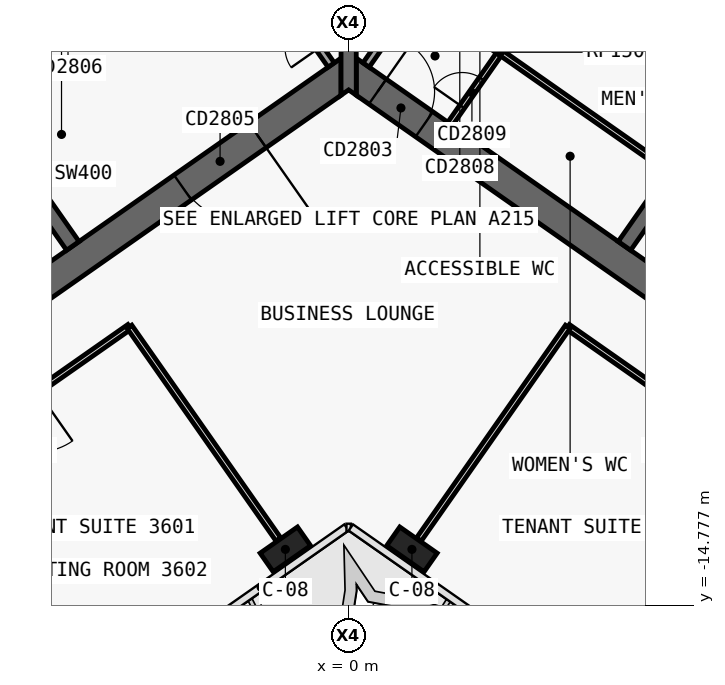
"""IFC4 building model, lengths in metres.
Left out: names, types, materials, properties, quantities, classifications, styles, units other than length and angle.
Written with IfcOpenShell. Run it as: python <this file> out.ifc"""

import sys

from ifc_helpers import new_model, si_unit, direction, frame, frame_2d, origin, origin_2d, place, context, subcontext, project, spatial, polyline, rectangle, outline, extrude, element, fill, save


model = new_model("IFC4")
c1 = context("Model", 3, precision=1e-05, world=origin(), true_north=direction((0.0, 1.0)))
c2 = subcontext(c1, "Body", "Model", "MODEL_VIEW")
j1 = project(units=[si_unit("LENGTHUNIT", "METRE"), si_unit("PLANEANGLEUNIT", "RADIAN")], contexts=[c1])
p1 = place(None, origin())
s1 = spatial("IfcSite", under=j1, at=p1, CompositionType="ELEMENT")
p2 = place(p1, origin())
s2 = spatial("IfcBuilding", under=s1, at=p2, CompositionType="ELEMENT")
p3 = place(p2, frame((0.0, 0.0, 159.3)))
s3 = spatial("IfcBuildingStorey", under=s2, at=p3, CompositionType="ELEMENT", Elevation=159.3)
p4 = place(p3, frame((0.029, 11.984, 0.0), z_axis=(0.0, 0.0, 1.0), x_axis=(-0.819151382952, -0.573577380837, 0.0)))
e1 = element("IfcWall", 1, at=p4, inside=s3, PredefinedType="SHEAR", context=c2, shape_type="SweptSolid", body=[
    extrude(outline(polyline([(33.898, 0.4), (0.56, 0.4), (-0.0, -0.4), (33.898, -0.4), (33.898, 0.4)])), origin(), (0.0, 0.0, 1.0), 3.9),
])
p5 = place(p3, frame((0.029, -0.712, 0.0), z_axis=(0.0, 0.0, 1.0), x_axis=(-0.819151758019, -0.573576845187, 0.0)))
e2 = element("IfcWall", 2, at=p5, inside=s3, PredefinedType="SHEAR", context=c2, shape_type="SweptSolid", body=[
    extrude(outline(polyline([(26.616, 0.4), (0.56, 0.4), (-0.0, -0.4), (26.616, -0.4), (26.616, 0.4)])), origin(), (0.0, 0.0, 1.0), 3.9),
])
p6 = place(p5, frame((2.966, 0.0, 0.0)))
e3 = element("IfcOpeningElement", 3, at=p6, cuts=e2, PredefinedType="OPENING", context=c2, shape_type="SweptSolid", body=[
    extrude(rectangle(XDim=2.4, YDim=2.1, at=frame_2d((1.2, 1.05))), frame((0.0, 0.41, 0.0), z_axis=(0.0, -1.0, 0.0), x_axis=(1.0, 0.0, 0.0)), (0.0, 0.0, 1.0), 0.82),
])
p7 = place(p5, frame((11.916, 0.0, 0.0)))
e4 = element("IfcOpeningElement", 4, at=p7, cuts=e2, PredefinedType="OPENING", context=c2, shape_type="SweptSolid", body=[
    extrude(rectangle(XDim=2.4, YDim=2.1, at=frame_2d((1.2, 1.05))), frame((0.0, 0.41, 0.0), z_axis=(0.0, -1.0, 0.0), x_axis=(1.0, 0.0, 0.0)), (0.0, 0.0, 1.0), 0.82),
])
p8 = place(p3, frame((-7.258, -5.326, 0.0), z_axis=(0.0, 0.0, 1.0), x_axis=(-0.573540709186, 0.819177059558, 0.0)))
e5 = element("IfcWall", 5, at=p8, inside=s3, PredefinedType="SHEAR", context=c2, shape_type="SweptSolid", body=[
    extrude(outline(polyline([(4.6, 0.2), (-0.0, 0.2), (-0.0, -0.2), (4.6, -0.2), (4.6, 0.2)])), origin(), (0.0, 0.0, 1.0), 3.9),
])
p9 = place(p3, frame((-2.638, 3.768, 0.0), z_axis=(0.0, 0.0, 1.0), x_axis=(-0.81915267502, -0.573575535572, 0.0)))
e6 = element("IfcWall", 6, at=p9, inside=s3, PredefinedType="SHEAR", context=c2, shape_type="SweptSolid", body=[
    extrude(outline(polyline([(26.2, 0.2), (0.0, 0.2), (0.0, -0.2), (26.2, -0.2), (26.2, 0.2)])), origin(), (0.0, 0.0, 1.0), 3.9),
])
p10 = place(p9, frame((1.169, 0.0, 0.0)))
e7 = element("IfcOpeningElement", 7, at=p10, cuts=e6, PredefinedType="OPENING", context=c2, shape_type="SweptSolid", body=[
    extrude(rectangle(XDim=1.1, YDim=2.1, at=frame_2d((0.55, 1.05))), frame((0.0, 0.21, 0.0), z_axis=(0.0, -1.0, 0.0), x_axis=(1.0, 0.0, 0.0)), (0.0, 0.0, 1.0), 0.42),
])
p11 = place(p9, frame((3.206, 0.0, 0.0)))
e8 = element("IfcOpeningElement", 8, at=p11, cuts=e6, PredefinedType="OPENING", context=c2, shape_type="SweptSolid", body=[
    extrude(rectangle(XDim=1.1, YDim=2.1, at=frame_2d((0.55, 1.05))), frame((0.0, 0.21, 0.0), z_axis=(0.0, -1.0, 0.0), x_axis=(1.0, 0.0, 0.0)), (0.0, 0.0, 1.0), 0.42),
])
p12 = place(p9, frame((5.244, 0.0, 0.0)))
e9 = element("IfcOpeningElement", 9, at=p12, cuts=e6, PredefinedType="OPENING", context=c2, shape_type="SweptSolid", body=[
    extrude(rectangle(XDim=1.1, YDim=2.1, at=frame_2d((0.55, 1.05))), frame((0.0, 0.21, 0.0), z_axis=(0.0, -1.0, 0.0), x_axis=(1.0, 0.0, 0.0)), (0.0, 0.0, 1.0), 0.42),
])
p13 = place(p9, frame((7.281, 0.0, 0.0)))
e10 = element("IfcOpeningElement", 10, at=p13, cuts=e6, PredefinedType="OPENING", context=c2, shape_type="SweptSolid", body=[
    extrude(rectangle(XDim=1.1, YDim=2.1, at=frame_2d((0.55, 1.05))), frame((0.0, 0.21, 0.0), z_axis=(0.0, -1.0, 0.0), x_axis=(1.0, 0.0, 0.0)), (0.0, 0.0, 1.0), 0.42),
])
p14 = place(p9, frame((9.688, 0.0, 0.0)))
e11 = element("IfcOpeningElement", 11, at=p14, cuts=e6, PredefinedType="OPENING", context=c2, shape_type="SweptSolid", body=[
    extrude(rectangle(XDim=1.1, YDim=2.1, at=frame_2d((0.55, 1.05))), frame((0.0, 0.21, 0.0), z_axis=(0.0, -1.0, 0.0), x_axis=(1.0, 0.0, 0.0)), (0.0, 0.0, 1.0), 0.42),
])
p15 = place(p9, frame((11.863, 0.0, 0.0)))
e12 = element("IfcOpeningElement", 12, at=p15, cuts=e6, PredefinedType="OPENING", context=c2, shape_type="SweptSolid", body=[
    extrude(rectangle(XDim=1.1, YDim=2.1, at=frame_2d((0.55, 1.05))), frame((0.0, 0.21, 0.0), z_axis=(0.0, -1.0, 0.0), x_axis=(1.0, 0.0, 0.0)), (0.0, 0.0, 1.0), 0.42),
])
p16 = place(p9, frame((14.038, 0.0, 0.0)))
e13 = element("IfcOpeningElement", 13, at=p16, cuts=e6, PredefinedType="OPENING", context=c2, shape_type="SweptSolid", body=[
    extrude(rectangle(XDim=1.1, YDim=2.1, at=frame_2d((0.55, 1.05))), frame((0.0, 0.21, 0.0), z_axis=(0.0, -1.0, 0.0), x_axis=(1.0, 0.0, 0.0)), (0.0, 0.0, 1.0), 0.42),
])
p17 = place(p9, frame((16.212, 0.0, 0.0)))
e14 = element("IfcOpeningElement", 14, at=p17, cuts=e6, PredefinedType="OPENING", context=c2, shape_type="SweptSolid", body=[
    extrude(rectangle(XDim=1.1, YDim=2.1, at=frame_2d((0.55, 1.05))), frame((0.0, 0.21, 0.0), z_axis=(0.0, -1.0, 0.0), x_axis=(1.0, 0.0, 0.0)), (0.0, 0.0, 1.0), 0.42),
])
p18 = place(p3, frame((-0.029, 11.984, 0.0), z_axis=(0.0, 0.0, 1.0), x_axis=(0.819151382952, -0.573577380837, 0.0)))
e15 = element("IfcWall", 15, at=p18, inside=s3, PredefinedType="SHEAR", context=c2, shape_type="SweptSolid", body=[
    extrude(outline(polyline([(33.898, 0.4), (-0.0, 0.4), (0.56, -0.4), (33.898, -0.4), (33.898, 0.4)])), origin(), (0.0, 0.0, 1.0), 3.9),
])
p19 = place(p3, frame((-0.029, -0.712, 0.0), z_axis=(0.0, 0.0, 1.0), x_axis=(0.819151758019, -0.573576845187, 0.0)))
e16 = element("IfcWall", 16, at=p19, inside=s3, PredefinedType="SHEAR", context=c2, shape_type="SweptSolid", body=[
    extrude(outline(polyline([(26.616, 0.4), (-0.0, 0.4), (0.56, -0.4), (26.616, -0.4), (26.616, 0.4)])), origin(), (0.0, 0.0, 1.0), 3.9),
])
p20 = place(p19, frame((0.966, 0.0, 0.0)))
e17 = element("IfcOpeningElement", 17, at=p20, cuts=e16, PredefinedType="OPENING", context=c2, shape_type="SweptSolid", body=[
    extrude(rectangle(XDim=1.5, YDim=2.1, at=frame_2d((0.75, 1.05))), frame((0.0, 0.41, 0.0), z_axis=(0.0, -1.0, 0.0), x_axis=(1.0, 0.0, 0.0)), (0.0, 0.0, 1.0), 0.82),
])
p21 = place(p19, frame((12.366, 0.0, 0.0)))
e18 = element("IfcOpeningElement", 18, at=p21, cuts=e16, PredefinedType="OPENING", context=c2, shape_type="SweptSolid", body=[
    extrude(rectangle(XDim=1.5, YDim=2.1, at=frame_2d((0.75, 1.05))), frame((0.0, 0.41, 0.0), z_axis=(0.0, -1.0, 0.0), x_axis=(1.0, 0.0, 0.0)), (0.0, 0.0, 1.0), 0.82),
])
p22 = place(p3, frame((7.258, -5.326, 0.0), z_axis=(0.0, 0.0, 1.0), x_axis=(0.573540709186, 0.819177059558, 0.0)))
e19 = element("IfcWall", 19, at=p22, inside=s3, PredefinedType="SHEAR", context=c2, shape_type="SweptSolid", body=[
    extrude(outline(polyline([(-0.0, 0.2), (-0.0, -0.2), (4.6, -0.2), (4.6, 0.2), (-0.0, 0.2)])), origin(), (0.0, 0.0, 1.0), 3.9),
])
p23 = place(p3, frame((2.638, 3.768, 0.0), z_axis=(0.0, 0.0, 1.0), x_axis=(0.81915267502, -0.573575535572, 0.0)))
e20 = element("IfcWall", 20, at=p23, inside=s3, PredefinedType="SHEAR", context=c2, shape_type="SweptSolid", body=[
    extrude(outline(polyline([(0.0, 0.2), (0.0, -0.2), (26.2, -0.2), (26.2, 0.2), (0.0, 0.2)])), origin(), (0.0, 0.0, 1.0), 3.9),
])
p24 = place(p23, frame((9.637, 0.0, 0.0)))
e21 = element("IfcOpeningElement", 21, at=p24, cuts=e20, PredefinedType="OPENING", context=c2, shape_type="SweptSolid", body=[
    extrude(rectangle(XDim=1.2, YDim=2.1, at=frame_2d((0.6, 1.05))), frame((0.0, 0.21, 0.0), z_axis=(0.0, -1.0, 0.0), x_axis=(1.0, 0.0, 0.0)), (0.0, 0.0, 1.0), 0.42),
])
p25 = place(p23, frame((11.812, 0.0, 0.0)))
e22 = element("IfcOpeningElement", 22, at=p25, cuts=e20, PredefinedType="OPENING", context=c2, shape_type="SweptSolid", body=[
    extrude(rectangle(XDim=1.2, YDim=2.1, at=frame_2d((0.6, 1.05))), frame((0.0, 0.21, 0.0), z_axis=(0.0, -1.0, 0.0), x_axis=(1.0, 0.0, 0.0)), (0.0, 0.0, 1.0), 0.42),
])
p26 = place(p23, frame((13.988, 0.0, 0.0)))
e23 = element("IfcOpeningElement", 23, at=p26, cuts=e20, PredefinedType="OPENING", context=c2, shape_type="SweptSolid", body=[
    extrude(rectangle(XDim=1.2, YDim=2.1, at=frame_2d((0.6, 1.05))), frame((0.0, 0.21, 0.0), z_axis=(0.0, -1.0, 0.0), x_axis=(1.0, 0.0, 0.0)), (0.0, 0.0, 1.0), 0.42),
])
p27 = place(p23, frame((16.262, 0.0, 0.0)))
e24 = element("IfcOpeningElement", 24, at=p27, cuts=e20, PredefinedType="OPENING", context=c2, shape_type="SweptSolid", body=[
    extrude(rectangle(XDim=1.0, YDim=2.1, at=frame_2d((0.5, 1.05))), frame((0.0, 0.21, 0.0), z_axis=(0.0, -1.0, 0.0), x_axis=(1.0, 0.0, 0.0)), (0.0, 0.0, 1.0), 0.42),
])
p28 = place(p3, frame((0.0, -1.361, 0.0), z_axis=(0.0, 0.0, 1.0), x_axis=(0.0, 1.0, 0.0)))
e25 = element("IfcWall", 25, at=p28, inside=s3, PredefinedType="SHEAR", context=c2, shape_type="SweptSolid", body=[
    extrude(outline(polyline([(0.0, -0.2), (0.14, -0.2), (1.075, -0.2), (12.696, -0.2), (13.813, -0.2), (13.893, -0.2), (13.933, -0.172), (13.813, 0.0), (13.933, 0.172), (13.893, 0.2), (13.813, 0.2), (12.696, 0.2), (1.075, 0.2), (0.14, 0.2), (0.0, 0.2), (0.14, 0.0), (0.0, -0.2)])), origin(), (0.0, 0.0, 1.0), 3.9),
])
for number, where, z_axis, x_axis in (
    (26, (-1.665, -13.313, 0.0), (0.0, 0.0, 1.0), (-0.819, -0.574, 0.0)),
    (27, (1.665, -13.313, 0.0), (0.0, 0.0, 1.0), (0.819, -0.574, 0.0)),
):
    element("IfcColumn", number, at=place(p3, frame(where, z_axis=z_axis, x_axis=x_axis)), inside=s3, PredefinedType="COLUMN", context=c2, shape_type="SweptSolid", body=[
        extrude(rectangle(XDim=1.2, YDim=0.6, at=origin_2d()), origin(), (0.0, 0.0, 1.0), 3.9),
    ])
p29 = place(p3, frame((2.67, -2.114, 0.0), z_axis=(0.0, 0.0, 1.0), x_axis=(0.573576324356, 0.819152122709, 0.0)))
e28 = element("IfcWall", 28, at=p29, inside=s3, PredefinedType="PARTITIONING", context=c2, shape_type="SweptSolid", body=[
    extrude(rectangle(XDim=4.6, YDim=0.15, at=frame_2d((2.3, 0.0))), origin(), (0.0, 0.0, 1.0), 3.62),
])
p30 = place(p29, frame((0.55, 0.0, 0.0)))
e29 = element("IfcOpeningElement", 29, at=p30, cuts=e28, PredefinedType="OPENING", context=c2, shape_type="SweptSolid", body=[
    extrude(rectangle(XDim=0.9, YDim=2.1, at=frame_2d((0.45, 1.05))), frame((0.0, 0.085, 0.0), z_axis=(0.0, -1.0, 0.0), x_axis=(1.0, 0.0, 0.0)), (0.0, 0.0, 1.0), 0.17),
])
p31 = place(p29, frame((2.95, 0.0, 0.0)))
e30 = element("IfcOpeningElement", 30, at=p31, cuts=e28, PredefinedType="OPENING", context=c2, shape_type="SweptSolid", body=[
    extrude(rectangle(XDim=0.9, YDim=2.1, at=frame_2d((0.45, 1.05))), frame((0.0, 0.085, 0.0), z_axis=(0.0, -1.0, 0.0), x_axis=(1.0, 0.0, 0.0)), (0.0, 0.0, 1.0), 0.17),
])
p32 = place(p3, frame((1.86, 1.261, 0.0), z_axis=(0.0, 0.0, 1.0), x_axis=(0.819103967032, -0.573645091666, 0.0)))
e31 = element("IfcWall", 31, at=p32, inside=s3, PredefinedType="PARTITIONING", context=c2, shape_type="SweptSolid", body=[
    extrude(rectangle(XDim=2.6, YDim=0.15, at=frame_2d((1.3, 0.0))), origin(), (0.0, 0.0, 1.0), 3.62),
])
p33 = place(p32, frame((0.85, 0.0, 0.0)))
e32 = element("IfcOpeningElement", 32, at=p33, cuts=e31, PredefinedType="OPENING", context=c2, shape_type="SweptSolid", body=[
    extrude(rectangle(XDim=0.9, YDim=2.1, at=frame_2d((0.45, 1.05))), frame((0.0, 0.085, 0.0), z_axis=(0.0, -1.0, 0.0), x_axis=(1.0, 0.0, 0.0)), (0.0, 0.0, 1.0), 0.17),
])
p34 = place(p3, frame((3.99, -0.23, 0.0), z_axis=(0.0, 0.0, 1.0), x_axis=(0.819153326956, -0.573574604508, 0.0)))
e33 = element("IfcWall", 33, at=p34, inside=s3, PredefinedType="PARTITIONING", context=c2, shape_type="SweptSolid", body=[
    extrude(rectangle(XDim=5.4, YDim=0.15, at=frame_2d((2.7, 0.0))), origin(), (0.0, 0.0, 1.0), 3.62),
])
p35 = place(p3, frame((-0.459, -0.565, 0.0), z_axis=(0.0, 0.0, 1.0), x_axis=(-0.573576324356, 0.819152122709, 0.0)))
e34 = element("IfcWall", 34, at=p35, inside=s3, PredefinedType="SOLIDWALL", context=c2, shape_type="SweptSolid", body=[
    extrude(rectangle(XDim=4.6, YDim=0.2, at=frame_2d((2.3, 0.0))), origin(), (0.0, 0.0, 1.0), 3.62),
])
p36 = place(p35, frame((0.55, 0.0, 0.0)))
e35 = element("IfcOpeningElement", 35, at=p36, cuts=e34, PredefinedType="OPENING", context=c2, shape_type="SweptSolid", body=[
    extrude(rectangle(XDim=0.9, YDim=2.1, at=frame_2d((0.45, 1.05))), frame((0.0, 0.11, 0.0), z_axis=(0.0, -1.0, 0.0), x_axis=(1.0, 0.0, 0.0)), (0.0, 0.0, 1.0), 0.22),
])
p37 = place(p3, frame((0.459, -0.565, 0.0), z_axis=(0.0, 0.0, 1.0), x_axis=(0.573576324356, 0.819152122709, 0.0)))
e36 = element("IfcWall", 36, at=p37, inside=s3, PredefinedType="SOLIDWALL", context=c2, shape_type="SweptSolid", body=[
    extrude(rectangle(XDim=4.6, YDim=0.2, at=frame_2d((2.3, 0.0))), origin(), (0.0, 0.0, 1.0), 3.62),
])
p38 = place(p37, frame((0.55, 0.0, 0.0)))
e37 = element("IfcOpeningElement", 37, at=p38, cuts=e36, PredefinedType="OPENING", context=c2, shape_type="SweptSolid", body=[
    extrude(rectangle(XDim=0.9, YDim=2.1, at=frame_2d((0.45, 1.05))), frame((0.0, 0.11, 0.0), z_axis=(0.0, -1.0, 0.0), x_axis=(1.0, 0.0, 0.0)), (0.0, 0.0, 1.0), 0.22),
])
p39 = place(p3, frame((11.912, -11.759, 0.0), z_axis=(0.0, 0.0, 1.0), x_axis=(-0.819150881364, 0.573578097177, 0.0)))
e38 = element("IfcWall", 38, at=p39, inside=s3, PredefinedType="PARTITIONING", context=c2, shape_type="SweptSolid", body=[
    extrude(rectangle(XDim=7.502, YDim=0.15, at=frame_2d((3.751, 0.0))), origin(), (0.0, 0.0, 1.0), 3.0),
])
p40 = place(p39, frame((2.951, 0.0, 0.0)))
e39 = element("IfcOpeningElement", 39, at=p40, cuts=e38, PredefinedType="OPENING", context=c2, shape_type="SweptSolid", body=[
    extrude(rectangle(XDim=1.6, YDim=2.1, at=frame_2d((0.8, 1.05))), frame((0.0, 0.085, 0.0), z_axis=(0.0, -1.0, 0.0), x_axis=(1.0, 0.0, 0.0)), (0.0, 0.0, 1.0), 0.17),
])
p41 = place(p3, frame((-5.766, -7.456, 0.0), z_axis=(0.0, 0.0, 1.0), x_axis=(-0.819150881364, -0.573578097177, 0.0)))
e40 = element("IfcWall", 40, at=p41, inside=s3, PredefinedType="PARTITIONING", context=c2, shape_type="SweptSolid", body=[
    extrude(rectangle(XDim=7.502, YDim=0.15, at=frame_2d((3.751, 0.0))), origin(), (0.0, 0.0, 1.0), 3.0),
])
p42 = place(p41, frame((2.951, 0.0, 0.0)))
e41 = element("IfcOpeningElement", 41, at=p42, cuts=e40, PredefinedType="OPENING", context=c2, shape_type="SweptSolid", body=[
    extrude(rectangle(XDim=1.6, YDim=2.1, at=frame_2d((0.8, 1.05))), frame((0.0, 0.085, 0.0), z_axis=(0.0, -1.0, 0.0), x_axis=(1.0, 0.0, 0.0)), (0.0, 0.0, 1.0), 0.17),
])
p43 = place(p3, frame((1.849, -13.051, 0.0), z_axis=(0.0, 0.0, 1.0), x_axis=(0.573577493031, 0.819151304393, 0.0)))
e42 = element("IfcWall", 42, at=p43, inside=s3, PredefinedType="PARTITIONING", context=c2, shape_type="SweptSolid", body=[
    extrude(rectangle(XDim=6.83, YDim=0.15, at=frame_2d((3.415, 0.0))), origin(), (0.0, 0.0, 1.0), 3.0),
])
p44 = place(p3, frame((-1.849, -13.051, 0.0), z_axis=(0.0, 0.0, 1.0), x_axis=(-0.57357985571, 0.819149650018, 0.0)))
e43 = element("IfcWall", 43, at=p44, inside=s3, PredefinedType="PARTITIONING", context=c2, shape_type="SweptSolid", body=[
    extrude(rectangle(XDim=6.832, YDim=0.15, at=frame_2d((3.416, 0.0))), origin(), (0.0, 0.0, 1.0), 3.0),
])
p45 = place(p3, frame((-7.608, -17.901, 0.0), z_axis=(0.0, 0.0, 1.0), x_axis=(-0.573556991349, 0.819165659482, 0.0)))
e44 = element("IfcWall", 44, at=p45, inside=s3, PredefinedType="PARTITIONING", context=c2, shape_type="SweptSolid", body=[
    extrude(rectangle(XDim=4.501, YDim=0.15, at=frame_2d((2.25, 0.0))), origin(), (0.0, 0.0, 1.0), 2.9),
])
p46 = place(p6, origin())
e45 = element("IfcDoor", 45, at=p46, inside=s3, OperationType="DOUBLE_DOOR_SINGLE_SWING", PredefinedType="DOOR", context=c2, shape_type="SweptSolid", body=[
    extrude(rectangle(XDim=2.4, YDim=2.1, at=frame_2d((1.2, 1.05))), frame((0.0, 0.025, 0.0), z_axis=(0.0, -1.0, 0.0), x_axis=(1.0, 0.0, 0.0)), (0.0, 0.0, 1.0), 0.05),
])
fill(e3, e45)
p47 = place(p30, origin())
e46 = element("IfcDoor", 46, at=p47, inside=s3, OperationType="SINGLE_SWING_RIGHT", PredefinedType="DOOR", context=c2, shape_type="SweptSolid", body=[
    extrude(rectangle(XDim=0.9, YDim=2.1, at=frame_2d((0.45, 1.05))), frame((0.0, 0.025, 0.0), z_axis=(0.0, -1.0, 0.0), x_axis=(1.0, 0.0, 0.0)), (0.0, 0.0, 1.0), 0.05),
])
fill(e29, e46)
p48 = place(p20, origin())
e47 = element("IfcDoor", 47, at=p48, inside=s3, OperationType="SINGLE_SWING_RIGHT", PredefinedType="DOOR", context=c2, shape_type="SweptSolid", body=[
    extrude(rectangle(XDim=1.5, YDim=2.1, at=frame_2d((0.75, 1.05))), frame((0.0, 0.025, 0.0), z_axis=(0.0, -1.0, 0.0), x_axis=(1.0, 0.0, 0.0)), (0.0, 0.0, 1.0), 0.05),
])
fill(e17, e47)
save(model, sys.argv[1])
